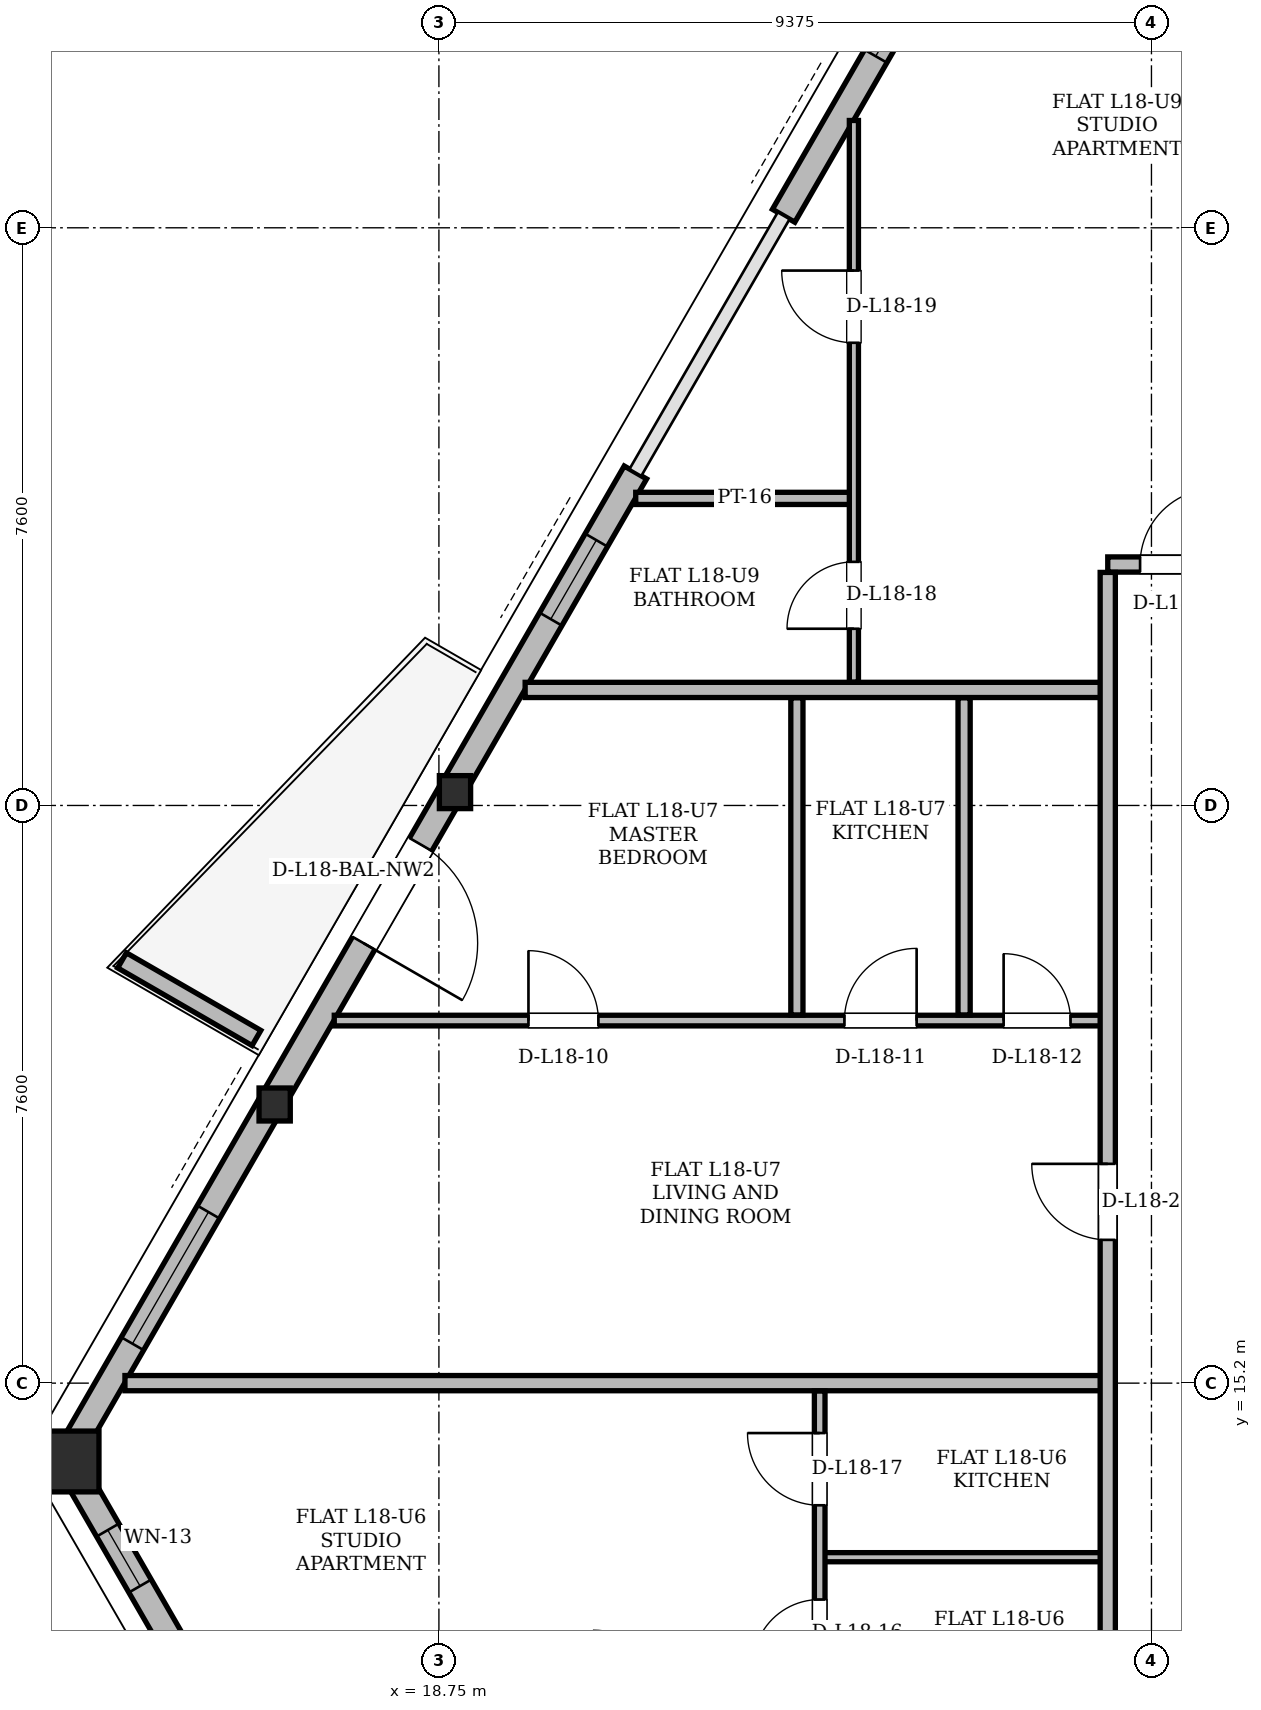
"""IFC4 building model, lengths in metres.
Left out: names, types, materials, properties, quantities, classifications, styles, units other than length and angle.
Written with IfcOpenShell. Run it as: python <this file> out.ifc"""

import sys

from ifc_helpers import new_model, si_unit, direction, frame, frame_2d, origin, origin_2d, place, context, subcontext, project, spatial, polyline, rectangle, hollow_rectangle, i_section, outline, extrude, element, fill, save


model = new_model("IFC4")
c1 = context("Model", 3, precision=1e-05, world=origin(), true_north=direction((0.0, 1.0)))
c2 = subcontext(c1, "Body", "Model", "MODEL_VIEW")
j1 = project(units=[si_unit("LENGTHUNIT", "METRE"), si_unit("PLANEANGLEUNIT", "RADIAN")], contexts=[c1])
p1 = place(None, origin())
s1 = spatial("IfcSite", under=j1, at=p1, CompositionType="ELEMENT")
p2 = place(p1, origin())
s2 = spatial("IfcBuilding", under=s1, at=p2, CompositionType="ELEMENT")
p3 = place(p2, frame((0.0, 0.0, 70.5)))
s3 = spatial("IfcBuildingStorey", under=s2, at=p3, CompositionType="ELEMENT", Elevation=70.5)
p4 = place(p3, frame((13.848, 14.212, 0.004), z_axis=(0.016581615647, -0.023513274647, 0.999586002272), x_axis=(0.817229610223, 0.576312210677, 0.0)))
e1 = element("IfcColumn", 1, at=p4, inside=s3, PredefinedType="COLUMN", context=c2, shape_type="SweptSolid", body=[
    extrude(hollow_rectangle(XDim=0.8, YDim=0.8, WallThickness=0.065, at=origin_2d()), origin(), (0.0, 0.0, 1.0), 3.593),
])
p5 = place(p3, frame((18.925, 23.007, 0.004), z_axis=(0.020184596448, -0.017262247467, 0.999647236218), x_axis=(0.649948056904, 0.759978633467, 0.0)))
e2 = element("IfcColumn", 2, at=p5, inside=s3, PredefinedType="COLUMN", context=c2, shape_type="SweptSolid", body=[
    extrude(i_section(OverallWidth=0.411, OverallDepth=0.434, WebThickness=0.036, FlangeThickness=0.057, at=origin_2d()), origin(), (0.0, 0.0, 1.0), 3.592),
])
p6 = place(p3, frame((16.556, 18.902, 0.004), z_axis=(0.018553114339, -0.020116197232, 0.99962549015), x_axis=(0.73508901116, 0.677970608266, 0.0)))
e3 = element("IfcColumn", 3, at=p6, inside=s3, PredefinedType="COLUMN", context=c2, shape_type="SweptSolid", body=[
    extrude(i_section(OverallWidth=0.411, OverallDepth=0.434, WebThickness=0.036, FlangeThickness=0.057, at=origin_2d()), origin(), (0.0, 0.0, 1.0), 3.593),
])
p7 = place(p3, frame((13.848, 14.212, 0.0), z_axis=(0.0, 0.0, 1.0), x_axis=(0.499987929025, -0.866032372853, 0.0)))
e4 = element("IfcWall", 4, at=p7, inside=s3, PredefinedType="SOLIDWALL", context=c2, shape_type="SweptSolid", body=[
    extrude(rectangle(XDim=13.453, YDim=0.34, at=frame_2d((6.727, 0.0))), origin(), (0.0, 0.0, 1.0), 2.494),
])
p8 = place(p7, frame((1.091, 0.0, 1.28)))
e5 = element("IfcOpeningElement", 5, at=p8, cuts=e4, PredefinedType="OPENING", context=c2, shape_type="SweptSolid", body=[
    extrude(rectangle(XDim=0.85, YDim=0.92, at=frame_2d((0.425, 0.46))), frame((0.0, 0.17, 0.0), z_axis=(0.0, -1.0, 0.0), x_axis=(1.0, 0.0, 0.0)), (0.0, 0.0, 1.0), 0.34),
])
p9 = place(p3, frame((30.773, 43.528, 0.0), z_axis=(0.0, 0.0, 1.0), x_axis=(-0.499999987774, -0.866025410843, 0.0)))
e6 = element("IfcWall", 6, at=p9, inside=s3, PredefinedType="SOLIDWALL", context=c2, shape_type="SweptSolid", body=[
    extrude(rectangle(XDim=14.976, YDim=0.34, at=frame_2d((7.488, 0.0))), origin(), (0.0, 0.0, 1.0), 2.494),
])
p10 = place(p9, frame((6.369, 0.0, 0.0)))
e7 = element("IfcOpeningElement", 7, at=p10, cuts=e6, PredefinedType="OPENING", context=c2, shape_type="SweptSolid", body=[
    extrude(rectangle(XDim=1.5, YDim=2.2, at=frame_2d((0.75, 1.1))), frame((0.0, 0.17, 0.0), z_axis=(0.0, -1.0, 0.0), x_axis=(1.0, 0.0, 0.0)), (0.0, 0.0, 1.0), 0.34),
])
p11 = place(p9, frame((3.269, 0.0, 0.85)))
e8 = element("IfcOpeningElement", 8, at=p11, cuts=e6, PredefinedType="OPENING", context=c2, shape_type="SweptSolid", body=[
    extrude(rectangle(XDim=1.2, YDim=1.48, at=frame_2d((0.6, 0.74))), frame((0.0, 0.17, 0.0), z_axis=(0.0, -1.0, 0.0), x_axis=(1.0, 0.0, 0.0)), (0.0, 0.0, 1.0), 0.34),
])
p12 = place(p9, frame((11.352, 0.0, 0.85)))
e9 = element("IfcOpeningElement", 9, at=p12, cuts=e6, PredefinedType="OPENING", context=c2, shape_type="SweptSolid", body=[
    extrude(rectangle(XDim=1.2, YDim=1.48, at=frame_2d((0.6, 0.74))), frame((0.0, 0.17, 0.0), z_axis=(0.0, -1.0, 0.0), x_axis=(1.0, 0.0, 0.0)), (0.0, 0.0, 1.0), 0.34),
])
p13 = place(p9, frame((1.796, 0.0, 0.85)))
e10 = element("IfcOpeningElement", 10, at=p13, cuts=e6, PredefinedType="OPENING", context=c2, shape_type="SweptSolid", body=[
    extrude(rectangle(XDim=1.2, YDim=1.48, at=frame_2d((0.6, 0.74))), frame((0.0, 0.17, 0.0), z_axis=(0.0, -1.0, 0.0), x_axis=(1.0, 0.0, 0.0)), (0.0, 0.0, 1.0), 0.34),
])
p14 = place(p3, frame((21.335, 27.181, 0.0), z_axis=(0.0, 0.0, 1.0), x_axis=(-0.499999987774, -0.866025410843, 0.0)))
e11 = element("IfcWall", 11, at=p14, inside=s3, PredefinedType="SOLIDWALL", context=c2, shape_type="SweptSolid", body=[
    extrude(rectangle(XDim=14.976, YDim=0.34, at=frame_2d((7.488, 0.0))), origin(), (0.0, 0.0, 1.0), 2.494),
])
p15 = place(p14, frame((5.651, 0.0, 0.0)))
e12 = element("IfcOpeningElement", 12, at=p15, cuts=e11, PredefinedType="OPENING", context=c2, shape_type="SweptSolid", body=[
    extrude(rectangle(XDim=1.5, YDim=2.2, at=frame_2d((0.75, 1.1))), frame((0.0, 0.17, 0.0), z_axis=(0.0, -1.0, 0.0), x_axis=(1.0, 0.0, 0.0)), (0.0, 0.0, 1.0), 0.34),
])
p16 = place(p14, frame((11.235, 0.0, 0.85)))
e13 = element("IfcOpeningElement", 13, at=p16, cuts=e11, PredefinedType="OPENING", context=c2, shape_type="SweptSolid", body=[
    extrude(rectangle(XDim=2.0, YDim=1.534, at=frame_2d((1.0, 0.767))), frame((0.0, 0.17, 0.0), z_axis=(0.0, -1.0, 0.0), x_axis=(1.0, 0.0, 0.0)), (0.0, 0.0, 1.0), 0.34),
])
p17 = place(p14, frame((1.028, 0.0, 0.85)))
e14 = element("IfcOpeningElement", 14, at=p17, cuts=e11, PredefinedType="OPENING", context=c2, shape_type="SweptSolid", body=[
    extrude(rectangle(XDim=1.2, YDim=1.48, at=frame_2d((0.6, 0.74))), frame((0.0, 0.17, 0.0), z_axis=(0.0, -1.0, 0.0), x_axis=(1.0, 0.0, 0.0)), (0.0, 0.0, 1.0), 0.34),
])
p18 = place(p3, frame((16.349, 19.741, 0.0), z_axis=(0.0, 0.0, 1.0), x_axis=(-0.866012356593, 0.500022597718, 0.0)))
e15 = element("IfcWall", 15, at=p18, inside=s3, PredefinedType="PARAPET", context=c2, shape_type="SweptSolid", body=[
    extrude(outline(polyline([(0.0, 0.0), (2.042, 0.0), (2.042, 1.1), (0.0, 1.32), (0.0, 0.0)])), frame((0.0, 0.115, 0.0), z_axis=(0.0, -1.0, 0.0), x_axis=(1.0, 0.0, 0.0)), (0.0, 0.0, 1.0), 0.23),
])
p19 = place(p3, frame((23.762, 12.91, 0.0), z_axis=(0.0, 0.0, 1.0), x_axis=(1.0, 0.0, 0.0)))
e16 = element("IfcWall", 16, at=p19, inside=s3, PredefinedType="PARTITIONING", context=c2, shape_type="SweptSolid", body=[
    extrude(rectangle(XDim=3.838, YDim=0.12, at=frame_2d((1.919, 0.0))), origin(), (0.0, 0.0, 1.0), 3.36),
])
p20 = place(p3, frame((14.619, 15.2, 0.0), z_axis=(0.0, 0.0, 1.0), x_axis=(1.0, 0.0, 0.0)))
e17 = element("IfcWall", 17, at=p20, inside=s3, PredefinedType="PARTITIONING", context=c2, shape_type="SweptSolid", body=[
    extrude(rectangle(XDim=12.931, YDim=0.2, at=frame_2d((6.465, 0.0))), origin(), (0.0, 0.0, 1.0), 2.494),
])
p21 = place(p3, frame((17.373, 19.97, 0.0), z_axis=(0.0, 0.0, 1.0), x_axis=(1.0, 0.0, 0.0)))
e18 = element("IfcWall", 18, at=p21, inside=s3, PredefinedType="PARTITIONING", context=c2, shape_type="SweptSolid", body=[
    extrude(rectangle(XDim=10.227, YDim=0.14, at=frame_2d((5.114, 0.0))), origin(), (0.0, 0.0, 1.0), 3.36),
])
p22 = place(p21, frame((2.555, 0.0, 0.0)))
e19 = element("IfcOpeningElement", 19, at=p22, cuts=e18, PredefinedType="OPENING", context=c2, shape_type="SweptSolid", body=[
    extrude(rectangle(XDim=0.92, YDim=2.12, at=frame_2d((0.46, 1.06))), frame((0.0, 0.07, 0.0), z_axis=(0.0, -1.0, 0.0), x_axis=(1.0, 0.0, 0.0)), (0.0, 0.0, 1.0), 0.14),
])
p23 = place(p21, frame((6.712, 0.0, 0.0)))
e20 = element("IfcOpeningElement", 20, at=p23, cuts=e18, PredefinedType="OPENING", context=c2, shape_type="SweptSolid", body=[
    extrude(rectangle(XDim=0.95, YDim=2.1, at=frame_2d((0.475, 1.05))), frame((0.0, 0.07, 0.0), z_axis=(0.0, -1.0, 0.0), x_axis=(1.0, 0.0, 0.0)), (0.0, 0.0, 1.0), 0.14),
])
p24 = place(p21, frame((8.807, 0.0, 0.0)))
e21 = element("IfcOpeningElement", 21, at=p24, cuts=e18, PredefinedType="OPENING", context=c2, shape_type="SweptSolid", body=[
    extrude(rectangle(XDim=0.88, YDim=2.08, at=frame_2d((0.44, 1.04))), frame((0.0, 0.07, 0.0), z_axis=(0.0, -1.0, 0.0), x_axis=(1.0, 0.0, 0.0)), (0.0, 0.0, 1.0), 0.14),
])
p25 = place(p3, frame((19.885, 24.32, 0.0), z_axis=(0.0, 0.0, 1.0), x_axis=(1.0, 0.0, 0.0)))
e22 = element("IfcWall", 22, at=p25, inside=s3, PredefinedType="PARTITIONING", context=c2, shape_type="SweptSolid", body=[
    extrude(rectangle(XDim=7.666, YDim=0.2, at=frame_2d((3.833, 0.0))), origin(), (0.0, 0.0, 1.0), 2.494),
])
p26 = place(p3, frame((27.55, 25.97, 0.0), z_axis=(0.0, 0.0, 1.0), x_axis=(1.0, 0.0, 0.0)))
e23 = element("IfcWall", 23, at=p26, inside=s3, PredefinedType="PARTITIONING", context=c2, shape_type="SweptSolid", body=[
    extrude(rectangle(XDim=19.9, YDim=0.2, at=frame_2d((9.95, 0.0))), origin(), (0.0, 0.0, 1.0), 2.738),
])
p27 = place(p26, frame((0.425, 0.0, 0.0)))
e24 = element("IfcOpeningElement", 24, at=p27, cuts=e23, PredefinedType="OPENING", context=c2, shape_type="SweptSolid", body=[
    extrude(rectangle(XDim=1.0, YDim=2.18, at=frame_2d((0.5, 1.09))), frame((0.0, 0.1, 0.0), z_axis=(0.0, -1.0, 0.0), x_axis=(1.0, 0.0, 0.0)), (0.0, 0.0, 1.0), 0.2),
])
p28 = place(p26, frame((4.347, 0.0, 0.0)))
e25 = element("IfcOpeningElement", 25, at=p28, cuts=e23, PredefinedType="OPENING", context=c2, shape_type="SweptSolid", body=[
    extrude(rectangle(XDim=1.0, YDim=2.18, at=frame_2d((0.5, 1.09))), frame((0.0, 0.1, 0.0), z_axis=(0.0, -1.0, 0.0), x_axis=(1.0, 0.0, 0.0)), (0.0, 0.0, 1.0), 0.2),
])
p29 = place(p26, frame((12.208, 0.0, 0.0)))
e26 = element("IfcOpeningElement", 26, at=p29, cuts=e23, PredefinedType="OPENING", context=c2, shape_type="SweptSolid", body=[
    extrude(rectangle(XDim=1.0, YDim=2.18, at=frame_2d((0.5, 1.09))), frame((0.0, 0.1, 0.0), z_axis=(0.0, -1.0, 0.0), x_axis=(1.0, 0.0, 0.0)), (0.0, 0.0, 1.0), 0.2),
])
p30 = place(p3, frame((21.34, 26.84, 0.0), z_axis=(0.0, 0.0, 1.0), x_axis=(1.0, 0.0, 0.0)))
e27 = element("IfcWall", 27, at=p30, inside=s3, PredefinedType="PARTITIONING", context=c2, shape_type="SweptSolid", body=[
    extrude(rectangle(XDim=2.867, YDim=0.16, at=frame_2d((1.434, 0.0))), origin(), (0.0, 0.0, 1.0), 3.36),
])
p31 = place(p3, frame((23.46, 20.044, 0.0), z_axis=(0.0, 0.0, 1.0), x_axis=(0.0, 1.0, 0.0)))
e28 = element("IfcWall", 28, at=p31, inside=s3, PredefinedType="PARTITIONING", context=c2, shape_type="SweptSolid", body=[
    extrude(rectangle(XDim=4.172, YDim=0.16, at=frame_2d((2.086, 0.0))), origin(), (0.0, 0.0, 1.0), 3.36),
])
p32 = place(p3, frame((23.76, 11.054, 0.0), z_axis=(0.0, 0.0, 1.0), x_axis=(0.0, 1.0, 0.0)))
e29 = element("IfcWall", 29, at=p32, inside=s3, PredefinedType="PARTITIONING", context=c2, shape_type="SweptSolid", body=[
    extrude(rectangle(XDim=4.042, YDim=0.14, at=frame_2d((2.021, 0.0))), origin(), (0.0, 0.0, 1.0), 2.738),
])
p33 = place(p32, frame((0.419, 0.0, 0.0)))
e30 = element("IfcOpeningElement", 30, at=p33, cuts=e29, PredefinedType="OPENING", context=c2, shape_type="SweptSolid", body=[
    extrude(rectangle(XDim=0.88, YDim=2.08, at=frame_2d((0.44, 1.04))), frame((0.0, 0.07, 0.0), z_axis=(0.0, -1.0, 0.0), x_axis=(1.0, 0.0, 0.0)), (0.0, 0.0, 1.0), 0.14),
])
p34 = place(p32, frame((2.539, 0.0, 0.0)))
e31 = element("IfcOpeningElement", 31, at=p34, cuts=e29, PredefinedType="OPENING", context=c2, shape_type="SweptSolid", body=[
    extrude(rectangle(XDim=0.95, YDim=2.1, at=frame_2d((0.475, 1.05))), frame((0.0, 0.07, 0.0), z_axis=(0.0, -1.0, 0.0), x_axis=(1.0, 0.0, 0.0)), (0.0, 0.0, 1.0), 0.14),
])
p35 = place(p3, frame((24.21, 24.424, 0.0), z_axis=(0.0, 0.0, 1.0), x_axis=(0.0, 1.0, 0.0)))
e32 = element("IfcWall", 32, at=p35, inside=s3, PredefinedType="PARTITIONING", context=c2, shape_type="SweptSolid", body=[
    extrude(rectangle(XDim=7.388, YDim=0.12, at=frame_2d((3.694, 0.0))), origin(), (0.0, 0.0, 1.0), 2.494),
])
p36 = place(p35, frame((0.701, 0.0, 0.0)))
e33 = element("IfcOpeningElement", 33, at=p36, cuts=e32, PredefinedType="OPENING", context=c2, shape_type="SweptSolid", body=[
    extrude(rectangle(XDim=0.88, YDim=2.08, at=frame_2d((0.44, 1.04))), frame((0.0, 0.06, 0.0), z_axis=(0.0, -1.0, 0.0), x_axis=(1.0, 0.0, 0.0)), (0.0, 0.0, 1.0), 0.12),
])
p37 = place(p35, frame((4.463, 0.0, 0.0)))
e34 = element("IfcOpeningElement", 34, at=p37, cuts=e32, PredefinedType="OPENING", context=c2, shape_type="SweptSolid", body=[
    extrude(rectangle(XDim=0.95, YDim=2.1, at=frame_2d((0.475, 1.05))), frame((0.0, 0.06, 0.0), z_axis=(0.0, -1.0, 0.0), x_axis=(1.0, 0.0, 0.0)), (0.0, 0.0, 1.0), 0.12),
])
p38 = place(p3, frame((25.66, 20.044, 0.0), z_axis=(0.0, 0.0, 1.0), x_axis=(0.0, 1.0, 0.0)))
e35 = element("IfcWall", 35, at=p38, inside=s3, PredefinedType="PARTITIONING", context=c2, shape_type="SweptSolid", body=[
    extrude(rectangle(XDim=4.172, YDim=0.16, at=frame_2d((2.086, 0.0))), origin(), (0.0, 0.0, 1.0), 3.36),
])
p39 = place(p3, frame((27.55, 11.054, 0.0), z_axis=(0.0, 0.0, 1.0), x_axis=(0.0, 1.0, 0.0)))
e36 = element("IfcWall", 36, at=p39, inside=s3, PredefinedType="PARTITIONING", context=c2, shape_type="SweptSolid", body=[
    extrude(rectangle(XDim=14.812, YDim=0.2, at=frame_2d((7.406, 0.0))), origin(), (0.0, 0.0, 1.0), 2.738),
])
p40 = place(p39, frame((6.031, 0.0, 0.0)))
e37 = element("IfcOpeningElement", 37, at=p40, cuts=e36, PredefinedType="OPENING", context=c2, shape_type="SweptSolid", body=[
    extrude(rectangle(XDim=1.0, YDim=2.18, at=frame_2d((0.5, 1.09))), frame((0.0, 0.1, 0.0), z_axis=(0.0, -1.0, 0.0), x_axis=(1.0, 0.0, 0.0)), (0.0, 0.0, 1.0), 0.2),
])
p41 = place(p12, origin())
e38 = element("IfcWindow", 38, at=p41, inside=s3, PartitioningType="SINGLE_PANEL", PredefinedType="WINDOW", context=c2, shape_type="SweptSolid", body=[
    extrude(rectangle(XDim=1.2, YDim=1.48, at=frame_2d((0.6, 0.74))), frame((0.0, 0.03, 0.0), z_axis=(0.0, -1.0, 0.0), x_axis=(1.0, 0.0, 0.0)), (0.0, 0.0, 1.0), 0.06),
])
fill(e9, e38)
p42 = place(p15, origin())
e39 = element("IfcDoor", 39, at=p42, inside=s3, OperationType="SINGLE_SWING_RIGHT", PredefinedType="DOOR", context=c2, shape_type="SweptSolid", body=[
    extrude(rectangle(XDim=1.5, YDim=2.2, at=frame_2d((0.75, 1.1))), frame((0.0, 0.025, 0.0), z_axis=(0.0, -1.0, 0.0), x_axis=(1.0, 0.0, 0.0)), (0.0, 0.0, 1.0), 0.05),
])
fill(e12, e39)
p43 = place(p16, origin())
e40 = element("IfcWindow", 40, at=p43, inside=s3, PartitioningType="SINGLE_PANEL", PredefinedType="WINDOW", context=c2, shape_type="SweptSolid", body=[
    extrude(rectangle(XDim=2.0, YDim=1.534, at=frame_2d((1.0, 0.767))), frame((0.0, 0.03, 0.0), z_axis=(0.0, -1.0, 0.0), x_axis=(1.0, 0.0, 0.0)), (0.0, 0.0, 1.0), 0.06),
])
fill(e13, e40)
p44 = place(p17, origin())
e41 = element("IfcWindow", 41, at=p44, inside=s3, PartitioningType="SINGLE_PANEL", PredefinedType="WINDOW", context=c2, shape_type="SweptSolid", body=[
    extrude(rectangle(XDim=1.2, YDim=1.48, at=frame_2d((0.6, 0.74))), frame((0.0, 0.03, 0.0), z_axis=(0.0, -1.0, 0.0), x_axis=(1.0, 0.0, 0.0)), (0.0, 0.0, 1.0), 0.06),
])
fill(e14, e41)
p45 = place(p8, origin())
e42 = element("IfcWindow", 42, at=p45, inside=s3, PartitioningType="SINGLE_PANEL", PredefinedType="WINDOW", context=c2, shape_type="SweptSolid", body=[
    extrude(rectangle(XDim=0.85, YDim=0.92, at=frame_2d((0.425, 0.46))), frame((0.0, 0.03, 0.0), z_axis=(0.0, -1.0, 0.0), x_axis=(1.0, 0.0, 0.0)), (0.0, 0.0, 1.0), 0.06),
])
fill(e5, e42)
p46 = place(p22, origin())
e43 = element("IfcDoor", 43, at=p46, inside=s3, OperationType="SINGLE_SWING_LEFT", PredefinedType="DOOR", context=c2, shape_type="SweptSolid", body=[
    extrude(rectangle(XDim=0.92, YDim=2.12, at=frame_2d((0.46, 1.06))), frame((0.0, 0.025, 0.0), z_axis=(0.0, -1.0, 0.0), x_axis=(1.0, 0.0, 0.0)), (0.0, 0.0, 1.0), 0.05),
])
fill(e19, e43)
p47 = place(p23, origin())
e44 = element("IfcDoor", 44, at=p47, inside=s3, OperationType="SINGLE_SWING_RIGHT", PredefinedType="DOOR", context=c2, shape_type="SweptSolid", body=[
    extrude(rectangle(XDim=0.95, YDim=2.1, at=frame_2d((0.475, 1.05))), frame((0.0, 0.025, 0.0), z_axis=(0.0, -1.0, 0.0), x_axis=(1.0, 0.0, 0.0)), (0.0, 0.0, 1.0), 0.05),
])
fill(e20, e44)
p48 = place(p24, origin())
e45 = element("IfcDoor", 45, at=p48, inside=s3, OperationType="SINGLE_SWING_LEFT", PredefinedType="DOOR", context=c2, shape_type="SweptSolid", body=[
    extrude(rectangle(XDim=0.88, YDim=2.08, at=frame_2d((0.44, 1.04))), frame((0.0, 0.025, 0.0), z_axis=(0.0, -1.0, 0.0), x_axis=(1.0, 0.0, 0.0)), (0.0, 0.0, 1.0), 0.05),
])
fill(e21, e45)
p49 = place(p27, origin())
e46 = element("IfcDoor", 46, at=p49, inside=s3, OperationType="SINGLE_SWING_RIGHT", PredefinedType="DOOR", context=c2, shape_type="SweptSolid", body=[
    extrude(rectangle(XDim=1.0, YDim=2.18, at=frame_2d((0.5, 1.09))), frame((0.0, 0.025, 0.0), z_axis=(0.0, -1.0, 0.0), x_axis=(1.0, 0.0, 0.0)), (0.0, 0.0, 1.0), 0.05),
])
fill(e24, e46)
p50 = place(p33, origin())
e47 = element("IfcDoor", 47, at=p50, inside=s3, OperationType="SINGLE_SWING_LEFT", PredefinedType="DOOR", context=c2, shape_type="SweptSolid", body=[
    extrude(rectangle(XDim=0.88, YDim=2.08, at=frame_2d((0.44, 1.04))), frame((0.0, 0.025, 0.0), z_axis=(0.0, -1.0, 0.0), x_axis=(1.0, 0.0, 0.0)), (0.0, 0.0, 1.0), 0.05),
])
fill(e30, e47)
p51 = place(p34, origin())
e48 = element("IfcDoor", 48, at=p51, inside=s3, OperationType="SINGLE_SWING_RIGHT", PredefinedType="DOOR", context=c2, shape_type="SweptSolid", body=[
    extrude(rectangle(XDim=0.95, YDim=2.1, at=frame_2d((0.475, 1.05))), frame((0.0, 0.025, 0.0), z_axis=(0.0, -1.0, 0.0), x_axis=(1.0, 0.0, 0.0)), (0.0, 0.0, 1.0), 0.05),
])
fill(e31, e48)
p52 = place(p36, origin())
e49 = element("IfcDoor", 49, at=p52, inside=s3, OperationType="SINGLE_SWING_LEFT", PredefinedType="DOOR", context=c2, shape_type="SweptSolid", body=[
    extrude(rectangle(XDim=0.88, YDim=2.08, at=frame_2d((0.44, 1.04))), frame((0.0, 0.025, 0.0), z_axis=(0.0, -1.0, 0.0), x_axis=(1.0, 0.0, 0.0)), (0.0, 0.0, 1.0), 0.05),
])
fill(e33, e49)
p53 = place(p37, origin())
e50 = element("IfcDoor", 50, at=p53, inside=s3, OperationType="SINGLE_SWING_RIGHT", PredefinedType="DOOR", context=c2, shape_type="SweptSolid", body=[
    extrude(rectangle(XDim=0.95, YDim=2.1, at=frame_2d((0.475, 1.05))), frame((0.0, 0.025, 0.0), z_axis=(0.0, -1.0, 0.0), x_axis=(1.0, 0.0, 0.0)), (0.0, 0.0, 1.0), 0.05),
])
fill(e34, e50)
p54 = place(p40, origin())
e51 = element("IfcDoor", 51, at=p54, inside=s3, OperationType="SINGLE_SWING_RIGHT", PredefinedType="DOOR", context=c2, shape_type="SweptSolid", body=[
    extrude(rectangle(XDim=1.0, YDim=2.18, at=frame_2d((0.5, 1.09))), frame((0.0, 0.025, 0.0), z_axis=(0.0, -1.0, 0.0), x_axis=(1.0, 0.0, 0.0)), (0.0, 0.0, 1.0), 0.05),
])
fill(e37, e51)
save(model, sys.argv[1])
